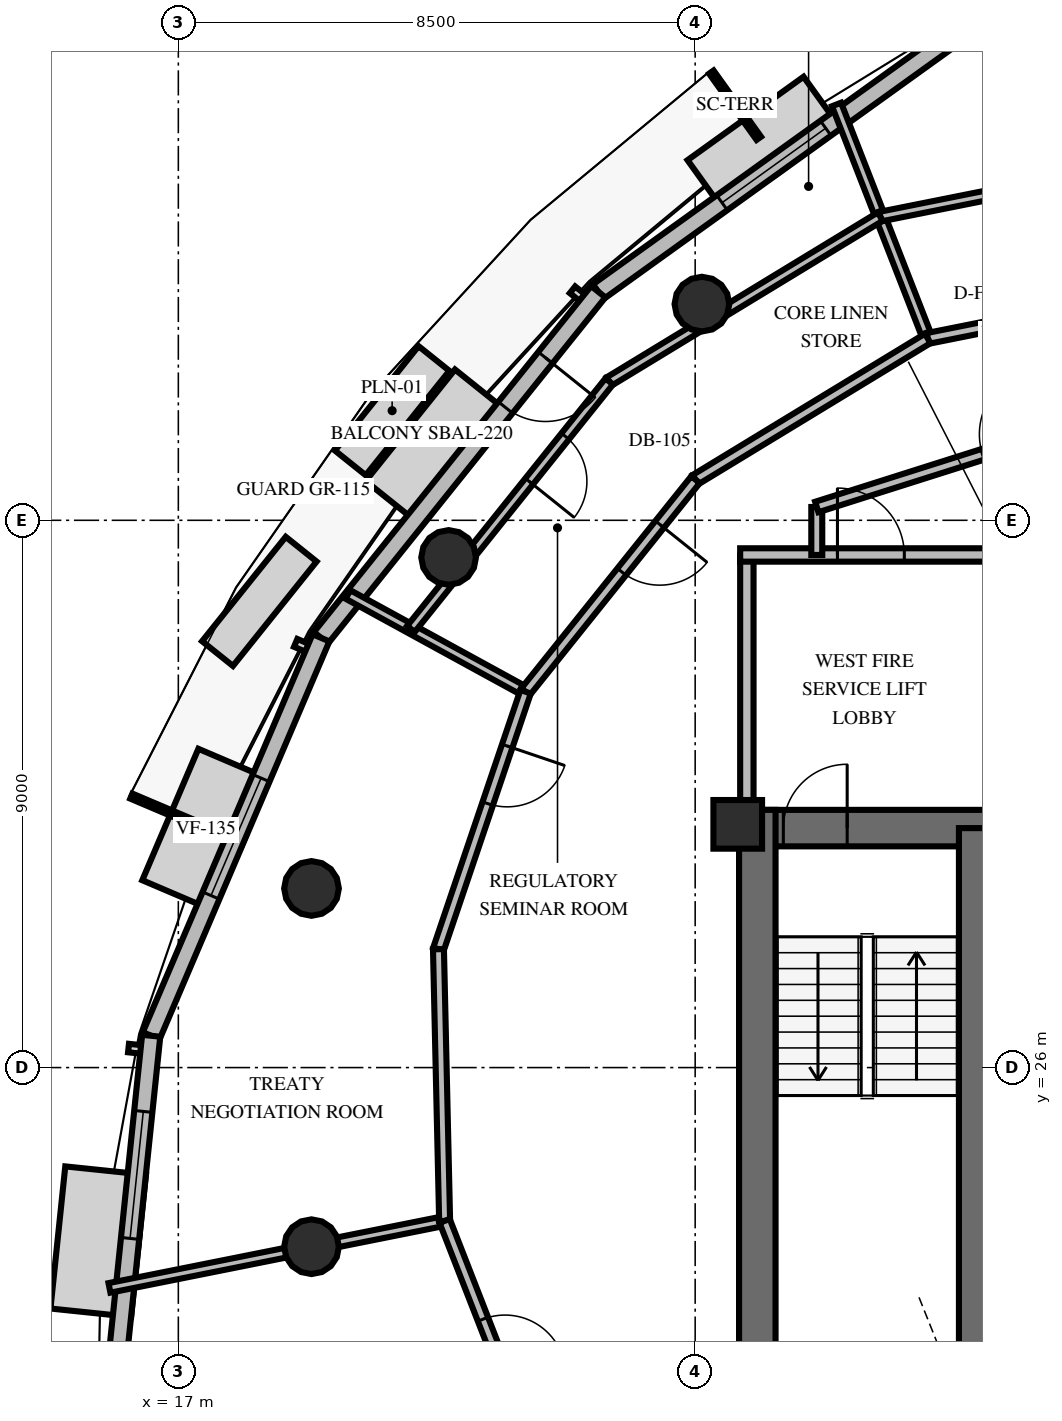
"""IFC4 building model, lengths in metres.
Left out: names, types, materials, properties, quantities, classifications, styles, units other than length and angle.
Written with IfcOpenShell. Run it as: python <this file> out.ifc"""

import sys

from ifc_helpers import new_model, si_unit, direction, frame, frame_2d, origin, origin_2d, place, context, subcontext, project, spatial, rectangle, circle, extrude, element, fill, save


model = new_model("IFC4")
c1 = context("Model", 3, precision=1e-05, world=origin(), true_north=direction((0.0, 1.0)))
c2 = subcontext(c1, "Body", "Model", "MODEL_VIEW")
j1 = project(units=[si_unit("LENGTHUNIT", "METRE"), si_unit("PLANEANGLEUNIT", "RADIAN")], contexts=[c1])
p1 = place(None, origin())
s1 = spatial("IfcSite", under=j1, at=p1, CompositionType="ELEMENT")
p2 = place(p1, origin())
s2 = spatial("IfcBuilding", under=s1, at=p2, CompositionType="ELEMENT")
p3 = place(p2, frame((0.0, 0.0, 244.8)))
s3 = spatial("IfcBuildingStorey", under=s2, at=p3, CompositionType="ELEMENT", Elevation=244.8)
p4 = place(p3, frame((26.222, 29.938, 0.0), z_axis=(0.0, 0.0, 1.0), x_axis=(1.0, 0.0, 0.0)))
e1 = element("IfcWall", 1, at=p4, inside=s3, PredefinedType="SHEAR", context=c2, shape_type="SweptSolid", body=[
    extrude(rectangle(XDim=15.566, YDim=0.6, at=frame_2d((7.783, 0.0))), origin(), (0.0, 0.0, 1.0), 3.6),
])
p5 = place(p4, frame((0.728, 0.0, 0.0)))
e2 = element("IfcOpeningElement", 2, at=p5, cuts=e1, PredefinedType="OPENING", context=c2, shape_type="SweptSolid", body=[
    extrude(rectangle(XDim=1.05, YDim=2.15, at=frame_2d((0.525, 1.075))), frame((0.0, 0.31, 0.0), z_axis=(0.0, -1.0, 0.0), x_axis=(1.0, 0.0, 0.0)), (0.0, 0.0, 1.0), 0.62),
])
p6 = place(p4, frame((13.778, 0.0, 0.0)))
e3 = element("IfcOpeningElement", 3, at=p6, cuts=e1, PredefinedType="OPENING", context=c2, shape_type="SweptSolid", body=[
    extrude(rectangle(XDim=1.05, YDim=2.15, at=frame_2d((0.525, 1.075))), frame((0.0, 0.31, 0.0), z_axis=(0.0, -1.0, 0.0), x_axis=(1.0, 0.0, 0.0)), (0.0, 0.0, 1.0), 0.62),
])
p7 = place(p4, frame((7.228, 0.0, 0.0)))
e4 = element("IfcOpeningElement", 4, at=p7, cuts=e1, PredefinedType="OPENING", context=c2, shape_type="SweptSolid", body=[
    extrude(rectangle(XDim=1.1, YDim=2.15, at=frame_2d((0.55, 1.075))), frame((0.0, 0.31, 0.0), z_axis=(0.0, -1.0, 0.0), x_axis=(1.0, 0.0, 0.0)), (0.0, 0.0, 1.0), 0.62),
])
p8 = place(p3, frame((26.522, 19.962, 0.0), z_axis=(0.0, 0.0, 1.0), x_axis=(0.0, 1.0, 0.0)))
e5 = element("IfcWall", 5, at=p8, inside=s3, PredefinedType="SHEAR", context=c2, shape_type="SweptSolid", body=[
    extrude(rectangle(XDim=10.276, YDim=0.6, at=frame_2d((5.138, 0.0))), origin(), (0.0, 0.0, 1.0), 3.6),
])
p9 = place(p3, frame((30.088, 20.262, 0.0), z_axis=(0.0, 0.0, 1.0), x_axis=(0.0, 1.0, 0.0)))
e6 = element("IfcWall", 6, at=p9, inside=s3, PredefinedType="SHEAR", context=c2, shape_type="SweptSolid", body=[
    extrude(rectangle(XDim=9.676, YDim=0.5, at=frame_2d((4.838, 0.0))), origin(), (0.0, 0.0, 1.0), 3.6),
])
p10 = place(p3, frame((26.2, 30.0, 0.0), z_axis=(0.0, 0.0, 1.0), x_axis=(1.0, 0.0, 0.0)))
e7 = element("IfcColumn", 7, at=p10, inside=s3, PredefinedType="PILASTER", context=c2, shape_type="SweptSolid", body=[
    extrude(rectangle(XDim=0.8, YDim=0.8, at=origin_2d()), origin(), (0.0, 0.0, 1.0), 3.6),
])
for number, where, z_axis, x_axis in (
    (8, (25.611, 38.555, 0.0), (0.0, 0.0, 1.0), (1.0, 0.0, 0.0)),
    (9, (21.445, 34.389, 0.0), (0.0, 0.0, 1.0), (1.0, 0.0, 0.0)),
    (10, (19.19, 28.946, 0.0), (0.0, 0.0, 1.0), (1.0, 0.0, 0.0)),
    (11, (19.19, 23.054, 0.0), (0.0, 0.0, 1.0), (1.0, 0.0, 0.0)),
):
    element("IfcColumn", number, at=place(p3, frame(where, z_axis=z_axis, x_axis=x_axis)), inside=s3, PredefinedType="COLUMN", context=c2, shape_type="SweptSolid", body=[
        extrude(circle(Radius=0.45, at=origin_2d()), origin(), (0.0, 0.0, 1.0), 3.6),
    ])
p11 = place(p3, frame((29.684, 42.912, 0.0), z_axis=(0.0, 0.0, 1.0), x_axis=(-0.81200266695, -0.583653723424, 0.0)))
e12 = element("IfcWall", 12, at=p11, inside=s3, PredefinedType="SOLIDWALL", context=c2, shape_type="SweptSolid", body=[
    extrude(rectangle(XDim=7.115, YDim=0.3, at=frame_2d((3.558, 0.0))), origin(), (0.0, 0.0, 1.0), 2.76),
])
p12 = place(p11, frame((2.508, 0.0, 0.8)))
e13 = element("IfcOpeningElement", 13, at=p12, cuts=e12, PredefinedType="OPENING", context=c2, shape_type="SweptSolid", body=[
    extrude(rectangle(XDim=2.1, YDim=1.85, at=frame_2d((1.05, 0.925))), frame((0.0, 0.16, 0.0), z_axis=(0.0, -1.0, 0.0), x_axis=(1.0, 0.0, 0.0)), (0.0, 0.0, 1.0), 0.32),
])
p13 = place(p3, frame((23.906, 38.76, 0.0), z_axis=(0.0, 0.0, 1.0), x_axis=(-0.625225587143, -0.780444082034, 0.0)))
e14 = element("IfcWall", 14, at=p13, inside=s3, PredefinedType="SOLIDWALL", context=c2, shape_type="SweptSolid", body=[
    extrude(rectangle(XDim=7.293, YDim=0.3, at=frame_2d((3.647, 0.0))), origin(), (0.0, 0.0, 1.0), 2.76),
])
p14 = place(p13, frame((1.39, 0.0, 0.0)))
e15 = element("IfcOpeningElement", 15, at=p14, cuts=e14, PredefinedType="OPENING", context=c2, shape_type="SweptSolid", body=[
    extrude(rectangle(XDim=1.05, YDim=2.15, at=frame_2d((0.525, 1.075))), frame((0.0, 0.16, 0.0), z_axis=(0.0, -1.0, 0.0), x_axis=(1.0, 0.0, 0.0)), (0.0, 0.0, 1.0), 0.32),
])
p15 = place(p3, frame((19.346, 33.067, 0.0), z_axis=(0.0, 0.0, 1.0), x_axis=(-0.392473519116, -0.919763304765, 0.0)))
e16 = element("IfcWall", 16, at=p15, inside=s3, PredefinedType="SOLIDWALL", context=c2, shape_type="SweptSolid", body=[
    extrude(rectangle(XDim=7.115, YDim=0.3, at=frame_2d((3.558, 0.0))), origin(), (0.0, 0.0, 1.0), 2.76),
])
p16 = place(p15, frame((2.508, 0.0, 0.8)))
e17 = element("IfcOpeningElement", 17, at=p16, cuts=e16, PredefinedType="OPENING", context=c2, shape_type="SweptSolid", body=[
    extrude(rectangle(XDim=2.1, YDim=1.85, at=frame_2d((1.05, 0.925))), frame((0.0, 0.16, 0.0), z_axis=(0.0, -1.0, 0.0), x_axis=(1.0, 0.0, 0.0)), (0.0, 0.0, 1.0), 0.32),
])
p17 = place(p3, frame((16.553, 26.523, 0.0), z_axis=(0.0, 0.0, 1.0), x_axis=(-0.103600024901, -0.994619040055, 0.0)))
e18 = element("IfcWall", 18, at=p17, inside=s3, PredefinedType="SOLIDWALL", context=c2, shape_type="SweptSolid", body=[
    extrude(rectangle(XDim=6.643, YDim=0.3, at=frame_2d((3.322, 0.0))), origin(), (0.0, 0.0, 1.0), 2.76),
])
p18 = place(p17, frame((1.251, 0.0, 0.8)))
e19 = element("IfcOpeningElement", 19, at=p18, cuts=e18, PredefinedType="OPENING", context=c2, shape_type="SweptSolid", body=[
    extrude(rectangle(XDim=2.1, YDim=1.85, at=frame_2d((1.05, 0.925))), frame((0.0, 0.16, 0.0), z_axis=(0.0, -1.0, 0.0), x_axis=(1.0, 0.0, 0.0)), (0.0, 0.0, 1.0), 0.32),
])
p19 = place(p3, frame((26.35, 30.05, 0.0), z_axis=(0.0, 0.0, 1.0), x_axis=(0.0, 1.0, 0.0)))
e20 = element("IfcWall", 20, at=p19, inside=s3, PredefinedType="SOLIDWALL", context=c2, shape_type="SweptSolid", body=[
    extrude(rectangle(XDim=4.38, YDim=0.22, at=frame_2d((2.19, 0.0))), origin(), (0.0, 0.0, 1.0), 2.46),
])
p20 = place(p3, frame((26.24, 34.43, 0.0), z_axis=(0.0, 0.0, 1.0), x_axis=(1.0, 0.0, 0.0)))
e21 = element("IfcWall", 21, at=p20, inside=s3, PredefinedType="SOLIDWALL", context=c2, shape_type="SweptSolid", body=[
    extrude(rectangle(XDim=4.31, YDim=0.22, at=frame_2d((2.155, 0.0))), origin(), (0.0, 0.0, 1.0), 2.46),
])
p21 = place(p20, frame((1.6, 0.0, 0.0)))
e22 = element("IfcOpeningElement", 22, at=p21, cuts=e21, PredefinedType="OPENING", context=c2, shape_type="SweptSolid", body=[
    extrude(rectangle(XDim=1.1, YDim=2.15, at=frame_2d((0.55, 1.075))), frame((0.0, 0.12, 0.0), z_axis=(0.0, -1.0, 0.0), x_axis=(1.0, 0.0, 0.0)), (0.0, 0.0, 1.0), 0.24),
])
p22 = place(p3, frame((27.5, 34.43, 0.0), z_axis=(0.0, 0.0, 1.0), x_axis=(0.0, 1.0, 0.0)))
e23 = element("IfcWall", 23, at=p22, inside=s3, PredefinedType="PARTITIONING", context=c2, shape_type="SweptSolid", body=[
    extrude(rectangle(XDim=0.789, YDim=0.18, at=frame_2d((0.395, 0.0))), origin(), (0.0, 0.0, 1.0), 2.46),
])
p23 = place(p3, frame((27.5, 35.219, 0.0), z_axis=(0.0, 0.0, 1.0), x_axis=(0.953228121756, 0.302251795518, 0.0)))
e24 = element("IfcWall", 24, at=p23, inside=s3, PredefinedType="PARTITIONING", context=c2, shape_type="SweptSolid", body=[
    extrude(rectangle(XDim=6.819, YDim=0.18, at=frame_2d((3.409, 0.0))), origin(), (0.0, 0.0, 1.0), 2.46),
])
p24 = place(p23, frame((2.86, 0.0, 0.0)))
e25 = element("IfcOpeningElement", 25, at=p24, cuts=e24, PredefinedType="OPENING", context=c2, shape_type="SweptSolid", body=[
    extrude(rectangle(XDim=1.1, YDim=2.15, at=frame_2d((0.55, 1.075))), frame((0.0, 0.1, 0.0), z_axis=(0.0, -1.0, 0.0), x_axis=(1.0, 0.0, 0.0)), (0.0, 0.0, 1.0), 0.2),
])
p25 = place(p3, frame((29.325, 37.991, 0.0), z_axis=(0.0, 0.0, 1.0), x_axis=(-0.36329344764, 0.931674766698, 0.0)))
e26 = element("IfcWall", 26, at=p25, inside=s3, PredefinedType="PARTITIONING", context=c2, shape_type="SweptSolid", body=[
    extrude(rectangle(XDim=4.13, YDim=0.16, at=frame_2d((2.065, 0.0))), origin(), (0.0, 0.0, 1.0), 2.46),
])
p26 = place(p3, frame((33.708, 38.867, 0.0), z_axis=(0.0, 0.0, 1.0), x_axis=(-0.980618472296, -0.195927057323, 0.0)))
e27 = element("IfcWall", 27, at=p26, inside=s3, PredefinedType="PARTITIONING", context=c2, shape_type="SweptSolid", body=[
    extrude(rectangle(XDim=4.47, YDim=0.18, at=frame_2d((2.235, 0.0))), origin(), (0.0, 0.0, 1.0), 2.46),
])
p27 = place(p3, frame((33.659, 41.016, 0.0), z_axis=(0.0, 0.0, 1.0), x_axis=(-0.980611265553, -0.195963123753, 0.0)))
e28 = element("IfcWall", 28, at=p27, inside=s3, PredefinedType="PARTITIONING", context=c2, shape_type="SweptSolid", body=[
    extrude(rectangle(XDim=5.216, YDim=0.16, at=frame_2d((2.608, 0.0))), origin(), (0.0, 0.0, 1.0), 2.46),
])
p28 = place(p3, frame((22.711, 32.18, 0.0), z_axis=(0.0, 0.0, 1.0), x_axis=(-0.877155073621, 0.480207222791, 0.0)))
e29 = element("IfcWall", 29, at=p28, inside=s3, PredefinedType="PARTITIONING", context=c2, shape_type="SweptSolid", body=[
    extrude(rectangle(XDim=3.331, YDim=0.16, at=frame_2d((1.666, 0.0))), origin(), (0.0, 0.0, 1.0), 2.46),
])
p29 = place(p3, frame((29.325, 37.991, 0.0), z_axis=(0.0, 0.0, 1.0), x_axis=(-0.854436839573, -0.519555278272, 0.0)))
e30 = element("IfcWall", 30, at=p29, inside=s3, PredefinedType="PARTITIONING", context=c2, shape_type="SweptSolid", body=[
    extrude(rectangle(XDim=4.47, YDim=0.18, at=frame_2d((2.235, 0.0))), origin(), (0.0, 0.0, 1.0), 2.46),
])
p30 = place(p3, frame((25.506, 35.669, 0.0), z_axis=(0.0, 0.0, 1.0), x_axis=(-0.625247763114, -0.78042631601, 0.0)))
e31 = element("IfcWall", 31, at=p30, inside=s3, PredefinedType="PARTITIONING", context=c2, shape_type="SweptSolid", body=[
    extrude(rectangle(XDim=4.47, YDim=0.18, at=frame_2d((2.235, 0.0))), origin(), (0.0, 0.0, 1.0), 2.46),
])
p31 = place(p30, frame((0.942, 0.0, 0.0)))
e32 = element("IfcOpeningElement", 32, at=p31, cuts=e31, PredefinedType="OPENING", context=c2, shape_type="SweptSolid", body=[
    extrude(rectangle(XDim=1.0, YDim=2.15, at=frame_2d((0.5, 1.075))), frame((0.0, 0.1, 0.0), z_axis=(0.0, -1.0, 0.0), x_axis=(1.0, 0.0, 0.0)), (0.0, 0.0, 1.0), 0.2),
])
p32 = place(p3, frame((28.544, 39.994, 0.0), z_axis=(0.0, 0.0, 1.0), x_axis=(-0.854455131512, -0.519525194993, 0.0)))
e33 = element("IfcWall", 33, at=p32, inside=s3, PredefinedType="PARTITIONING", context=c2, shape_type="SweptSolid", body=[
    extrude(rectangle(XDim=5.216, YDim=0.16, at=frame_2d((2.608, 0.0))), origin(), (0.0, 0.0, 1.0), 2.46),
])
p33 = place(p3, frame((24.087, 37.284, 0.0), z_axis=(0.0, 0.0, 1.0), x_axis=(-0.625265628486, -0.78041200262, 0.0)))
e34 = element("IfcWall", 34, at=p33, inside=s3, PredefinedType="PARTITIONING", context=c2, shape_type="SweptSolid", body=[
    extrude(rectangle(XDim=5.217, YDim=0.16, at=frame_2d((2.608, 0.0))), origin(), (0.0, 0.0, 1.0), 2.46),
])
p34 = place(p33, frame((1.156, 0.0, 0.0)))
e35 = element("IfcOpeningElement", 35, at=p34, cuts=e34, PredefinedType="OPENING", context=c2, shape_type="SweptSolid", body=[
    extrude(rectangle(XDim=0.95, YDim=2.15, at=frame_2d((0.475, 1.075))), frame((0.0, 0.09, 0.0), z_axis=(0.0, -1.0, 0.0), x_axis=(1.0, 0.0, 0.0)), (0.0, 0.0, 1.0), 0.18),
])
p35 = place(p3, frame((21.379, 23.478, 0.0), z_axis=(0.0, 0.0, 1.0), x_axis=(-0.980610732567, -0.195965790829, 0.0)))
e36 = element("IfcWall", 36, at=p35, inside=s3, PredefinedType="PARTITIONING", context=c2, shape_type="SweptSolid", body=[
    extrude(rectangle(XDim=5.621, YDim=0.16, at=frame_2d((2.811, 0.0))), origin(), (0.0, 0.0, 1.0), 2.46),
])
p36 = place(p3, frame((22.711, 32.18, 0.0), z_axis=(0.0, 0.0, 1.0), x_axis=(-0.320632364631, -0.947203719773, 0.0)))
e37 = element("IfcWall", 37, at=p36, inside=s3, PredefinedType="PARTITIONING", context=c2, shape_type="SweptSolid", body=[
    extrude(rectangle(XDim=4.47, YDim=0.18, at=frame_2d((2.235, 0.0))), origin(), (0.0, 0.0, 1.0), 2.46),
])
p37 = place(p36, frame((0.942, 0.0, 0.0)))
e38 = element("IfcOpeningElement", 38, at=p37, cuts=e37, PredefinedType="OPENING", context=c2, shape_type="SweptSolid", body=[
    extrude(rectangle(XDim=1.0, YDim=2.15, at=frame_2d((0.5, 1.075))), frame((0.0, 0.1, 0.0), z_axis=(0.0, -1.0, 0.0), x_axis=(1.0, 0.0, 0.0)), (0.0, 0.0, 1.0), 0.2),
])
p38 = place(p3, frame((21.278, 27.947, 0.0), z_axis=(0.0, 0.0, 1.0), x_axis=(0.022668052471, -0.999743046686, 0.0)))
e39 = element("IfcWall", 39, at=p38, inside=s3, PredefinedType="PARTITIONING", context=c2, shape_type="SweptSolid", body=[
    extrude(rectangle(XDim=4.47, YDim=0.18, at=frame_2d((2.235, 0.0))), origin(), (0.0, 0.0, 1.0), 2.46),
])
p39 = place(p3, frame((21.379, 23.478, 0.0), z_axis=(0.0, 0.0, 1.0), x_axis=(0.363268474482, -0.931684504243, 0.0)))
e40 = element("IfcWall", 40, at=p39, inside=s3, PredefinedType="PARTITIONING", context=c2, shape_type="SweptSolid", body=[
    extrude(rectangle(XDim=4.47, YDim=0.18, at=frame_2d((2.235, 0.0))), origin(), (0.0, 0.0, 1.0), 2.46),
])
p40 = place(p39, frame((1.735, 0.0, 0.0)))
e41 = element("IfcOpeningElement", 41, at=p40, cuts=e40, PredefinedType="OPENING", context=c2, shape_type="SweptSolid", body=[
    extrude(rectangle(XDim=1.0, YDim=2.15, at=frame_2d((0.5, 1.075))), frame((0.0, 0.1, 0.0), z_axis=(0.0, -1.0, 0.0), x_axis=(1.0, 0.0, 0.0)), (0.0, 0.0, 1.0), 0.2),
])
p41 = place(p12, origin())
e42 = element("IfcWindow", 42, at=p41, inside=s3, PartitioningType="SINGLE_PANEL", PredefinedType="WINDOW", context=c2, shape_type="SweptSolid", body=[
    extrude(rectangle(XDim=2.1, YDim=1.85, at=frame_2d((1.05, 0.925))), frame((0.0, 0.03, 0.0), z_axis=(0.0, -1.0, 0.0), x_axis=(1.0, 0.0, 0.0)), (0.0, 0.0, 1.0), 0.06),
])
fill(e13, e42)
p42 = place(p14, origin())
e43 = element("IfcDoor", 43, at=p42, inside=s3, OperationType="SINGLE_SWING_LEFT", PredefinedType="DOOR", context=c2, shape_type="SweptSolid", body=[
    extrude(rectangle(XDim=1.05, YDim=2.15, at=frame_2d((0.525, 1.075))), frame((0.0, 0.025, 0.0), z_axis=(0.0, -1.0, 0.0), x_axis=(1.0, 0.0, 0.0)), (0.0, 0.0, 1.0), 0.05),
])
fill(e15, e43)
p43 = place(p16, origin())
e44 = element("IfcWindow", 44, at=p43, inside=s3, PartitioningType="SINGLE_PANEL", PredefinedType="WINDOW", context=c2, shape_type="SweptSolid", body=[
    extrude(rectangle(XDim=2.1, YDim=1.85, at=frame_2d((1.05, 0.925))), frame((0.0, 0.03, 0.0), z_axis=(0.0, -1.0, 0.0), x_axis=(1.0, 0.0, 0.0)), (0.0, 0.0, 1.0), 0.06),
])
fill(e17, e44)
p44 = place(p18, origin())
e45 = element("IfcWindow", 45, at=p44, inside=s3, PartitioningType="SINGLE_PANEL", PredefinedType="WINDOW", context=c2, shape_type="SweptSolid", body=[
    extrude(rectangle(XDim=2.1, YDim=1.85, at=frame_2d((1.05, 0.925))), frame((0.0, 0.03, 0.0), z_axis=(0.0, -1.0, 0.0), x_axis=(1.0, 0.0, 0.0)), (0.0, 0.0, 1.0), 0.06),
])
fill(e19, e45)
p45 = place(p5, origin())
e46 = element("IfcDoor", 46, at=p45, inside=s3, OperationType="SINGLE_SWING_RIGHT", PredefinedType="DOOR", context=c2, shape_type="SweptSolid", body=[
    extrude(rectangle(XDim=1.05, YDim=2.15, at=frame_2d((0.525, 1.075))), frame((0.0, 0.025, 0.0), z_axis=(0.0, -1.0, 0.0), x_axis=(1.0, 0.0, 0.0)), (0.0, 0.0, 1.0), 0.05),
])
fill(e2, e46)
p46 = place(p21, origin())
e47 = element("IfcDoor", 47, at=p46, inside=s3, OperationType="SINGLE_SWING_LEFT", PredefinedType="DOOR", context=c2, shape_type="SweptSolid", body=[
    extrude(rectangle(XDim=1.1, YDim=2.15, at=frame_2d((0.55, 1.075))), frame((0.0, 0.025, 0.0), z_axis=(0.0, -1.0, 0.0), x_axis=(1.0, 0.0, 0.0)), (0.0, 0.0, 1.0), 0.05),
])
fill(e22, e47)
p47 = place(p24, origin())
e48 = element("IfcDoor", 48, at=p47, inside=s3, OperationType="SINGLE_SWING_RIGHT", PredefinedType="DOOR", context=c2, shape_type="SweptSolid", body=[
    extrude(rectangle(XDim=1.1, YDim=2.15, at=frame_2d((0.55, 1.075))), frame((0.0, 0.025, 0.0), z_axis=(0.0, -1.0, 0.0), x_axis=(1.0, 0.0, 0.0)), (0.0, 0.0, 1.0), 0.05),
])
fill(e25, e48)
p48 = place(p31, origin())
e49 = element("IfcDoor", 49, at=p48, inside=s3, OperationType="SINGLE_SWING_LEFT", PredefinedType="DOOR", context=c2, shape_type="SweptSolid", body=[
    extrude(rectangle(XDim=1.0, YDim=2.15, at=frame_2d((0.5, 1.075))), frame((0.0, 0.025, 0.0), z_axis=(0.0, -1.0, 0.0), x_axis=(1.0, 0.0, 0.0)), (0.0, 0.0, 1.0), 0.05),
])
fill(e32, e49)
p49 = place(p34, origin())
e50 = element("IfcDoor", 50, at=p49, inside=s3, OperationType="SINGLE_SWING_RIGHT", PredefinedType="DOOR", context=c2, shape_type="SweptSolid", body=[
    extrude(rectangle(XDim=0.95, YDim=2.15, at=frame_2d((0.475, 1.075))), frame((0.0, 0.025, 0.0), z_axis=(0.0, -1.0, 0.0), x_axis=(1.0, 0.0, 0.0)), (0.0, 0.0, 1.0), 0.05),
])
fill(e35, e50)
p50 = place(p37, origin())
e51 = element("IfcDoor", 51, at=p50, inside=s3, OperationType="SINGLE_SWING_LEFT", PredefinedType="DOOR", context=c2, shape_type="SweptSolid", body=[
    extrude(rectangle(XDim=1.0, YDim=2.15, at=frame_2d((0.5, 1.075))), frame((0.0, 0.025, 0.0), z_axis=(0.0, -1.0, 0.0), x_axis=(1.0, 0.0, 0.0)), (0.0, 0.0, 1.0), 0.05),
])
fill(e38, e51)
p51 = place(p40, origin())
e52 = element("IfcDoor", 52, at=p51, inside=s3, OperationType="SINGLE_SWING_RIGHT", PredefinedType="DOOR", context=c2, shape_type="SweptSolid", body=[
    extrude(rectangle(XDim=1.0, YDim=2.15, at=frame_2d((0.5, 1.075))), frame((0.0, 0.025, 0.0), z_axis=(0.0, -1.0, 0.0), x_axis=(1.0, 0.0, 0.0)), (0.0, 0.0, 1.0), 0.05),
])
fill(e41, e52)
save(model, sys.argv[1])
